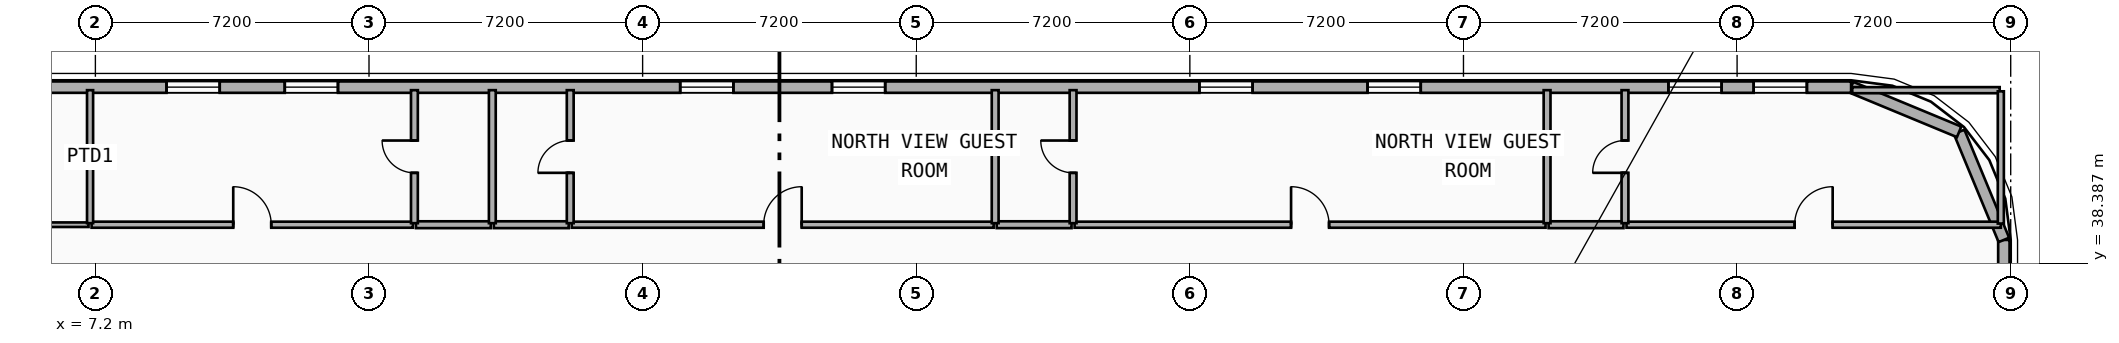
"""IFC4 building model, lengths in metres.
Left out: names, types, materials, properties, quantities, classifications, styles, units other than length and angle.
Written with IfcOpenShell. Run it as: python <this file> out.ifc"""

import sys

from ifc_helpers import new_model, si_unit, direction, frame, frame_2d, origin, place, context, subcontext, project, spatial, rectangle, extrude, element, fill, save


model = new_model("IFC4")
c1 = context("Model", 3, precision=1e-05, world=origin(), true_north=direction((0.0, 1.0)))
c2 = subcontext(c1, "Body", "Model", "MODEL_VIEW")
j1 = project(units=[si_unit("LENGTHUNIT", "METRE"), si_unit("PLANEANGLEUNIT", "RADIAN")], contexts=[c1])
p1 = place(None, origin())
s1 = spatial("IfcSite", under=j1, at=p1, CompositionType="ELEMENT")
p2 = place(p1, origin())
s2 = spatial("IfcBuilding", under=s1, at=p2, CompositionType="ELEMENT")
p3 = place(p2, frame((0.0, 0.0, 125.8)))
s3 = spatial("IfcBuildingStorey", under=s2, at=p3, CompositionType="ELEMENT", Elevation=125.8)
p4 = place(p3, frame((57.42, 39.0, 0.0), z_axis=(0.0, 0.0, 1.0), x_axis=(0.0, -1.0, 0.0)))
e1 = element("IfcWall", 1, at=p4, inside=s3, PredefinedType="SOLIDWALL", context=c2, shape_type="SweptSolid", body=[
    extrude(rectangle(XDim=18.0, YDim=0.3, at=frame_2d((9.0, 0.0))), origin(), (0.0, 0.0, 1.0), 3.24),
])
p5 = place(p4, frame((8.882, 0.0, 0.48)))
e2 = element("IfcOpeningElement", 2, at=p5, cuts=e1, PredefinedType="OPENING", context=c2, shape_type="SweptSolid", body=[
    extrude(rectangle(XDim=1.4, YDim=1.8, at=frame_2d((0.7, 0.9))), frame((0.0, 0.16, 0.0), z_axis=(0.0, -1.0, 0.0), x_axis=(1.0, 0.0, 0.0)), (0.0, 0.0, 1.0), 0.32),
])
p6 = place(p4, frame((3.621, 0.0, 0.48)))
e3 = element("IfcOpeningElement", 3, at=p6, cuts=e1, PredefinedType="OPENING", context=c2, shape_type="SweptSolid", body=[
    extrude(rectangle(XDim=1.4, YDim=1.8, at=frame_2d((0.7, 0.9))), frame((0.0, 0.16, 0.0), z_axis=(0.0, -1.0, 0.0), x_axis=(1.0, 0.0, 0.0)), (0.0, 0.0, 1.0), 0.32),
])
p7 = place(p4, frame((14.625, 0.0, 0.48)))
e4 = element("IfcOpeningElement", 4, at=p7, cuts=e1, PredefinedType="OPENING", context=c2, shape_type="SweptSolid", body=[
    extrude(rectangle(XDim=1.4, YDim=1.8, at=frame_2d((0.7, 0.9))), frame((0.0, 0.16, 0.0), z_axis=(0.0, -1.0, 0.0), x_axis=(1.0, 0.0, 0.0)), (0.0, 0.0, 1.0), 0.32),
])
p8 = place(p3, frame((56.243, 41.843, 0.0), z_axis=(0.0, 0.0, 1.0), x_axis=(0.382636798336, -0.92389884758, 0.0)))
e5 = element("IfcWall", 5, at=p8, inside=s3, PredefinedType="SOLIDWALL", context=c2, shape_type="SweptSolid", body=[
    extrude(rectangle(XDim=3.077, YDim=0.3, at=frame_2d((1.538, 0.0))), origin(), (0.0, 0.0, 1.0), 3.24),
])
p9 = place(p3, frame((53.4, 43.02, 0.0), z_axis=(0.0, 0.0, 1.0), x_axis=(0.923882414032, -0.382676475685, 0.0)))
e6 = element("IfcWall", 6, at=p9, inside=s3, PredefinedType="SOLIDWALL", context=c2, shape_type="SweptSolid", body=[
    extrude(rectangle(XDim=3.077, YDim=0.3, at=frame_2d((1.539, 0.0))), origin(), (0.0, 0.0, 1.0), 3.24),
])
p10 = place(p3, frame((4.2, 43.02, 0.0), z_axis=(0.0, 0.0, 1.0), x_axis=(1.0, 0.0, 0.0)))
e7 = element("IfcWall", 7, at=p10, inside=s3, PredefinedType="SOLIDWALL", context=c2, shape_type="SweptSolid", body=[
    extrude(rectangle(XDim=49.2, YDim=0.3, at=frame_2d((24.6, 0.0))), origin(), (0.0, 0.0, 1.0), 3.24),
])
p11 = place(p10, frame((4.872, 0.0, 0.85)))
e8 = element("IfcOpeningElement", 8, at=p11, cuts=e7, PredefinedType="OPENING", context=c2, shape_type="SweptSolid", body=[
    extrude(rectangle(XDim=1.4, YDim=1.8, at=frame_2d((0.7, 0.9))), frame((0.0, 0.16, 0.0), z_axis=(0.0, -1.0, 0.0), x_axis=(1.0, 0.0, 0.0)), (0.0, 0.0, 1.0), 0.32),
])
p12 = place(p10, frame((7.983, 0.0, 0.85)))
e9 = element("IfcOpeningElement", 9, at=p12, cuts=e7, PredefinedType="OPENING", context=c2, shape_type="SweptSolid", body=[
    extrude(rectangle(XDim=1.4, YDim=1.8, at=frame_2d((0.7, 0.9))), frame((0.0, 0.16, 0.0), z_axis=(0.0, -1.0, 0.0), x_axis=(1.0, 0.0, 0.0)), (0.0, 0.0, 1.0), 0.32),
])
p13 = place(p10, frame((18.389, 0.0, 0.85)))
e10 = element("IfcOpeningElement", 10, at=p13, cuts=e7, PredefinedType="OPENING", context=c2, shape_type="SweptSolid", body=[
    extrude(rectangle(XDim=1.4, YDim=1.8, at=frame_2d((0.7, 0.9))), frame((0.0, 0.16, 0.0), z_axis=(0.0, -1.0, 0.0), x_axis=(1.0, 0.0, 0.0)), (0.0, 0.0, 1.0), 0.32),
])
p14 = place(p10, frame((22.383, 0.0, 0.85)))
e11 = element("IfcOpeningElement", 11, at=p14, cuts=e7, PredefinedType="OPENING", context=c2, shape_type="SweptSolid", body=[
    extrude(rectangle(XDim=1.4, YDim=1.8, at=frame_2d((0.7, 0.9))), frame((0.0, 0.16, 0.0), z_axis=(0.0, -1.0, 0.0), x_axis=(1.0, 0.0, 0.0)), (0.0, 0.0, 1.0), 0.32),
])
p15 = place(p10, frame((32.051, 0.0, 0.85)))
e12 = element("IfcOpeningElement", 12, at=p15, cuts=e7, PredefinedType="OPENING", context=c2, shape_type="SweptSolid", body=[
    extrude(rectangle(XDim=1.4, YDim=1.8, at=frame_2d((0.7, 0.9))), frame((0.0, 0.16, 0.0), z_axis=(0.0, -1.0, 0.0), x_axis=(1.0, 0.0, 0.0)), (0.0, 0.0, 1.0), 0.32),
])
p16 = place(p10, frame((36.476, 0.0, 0.85)))
e13 = element("IfcOpeningElement", 13, at=p16, cuts=e7, PredefinedType="OPENING", context=c2, shape_type="SweptSolid", body=[
    extrude(rectangle(XDim=1.4, YDim=1.8, at=frame_2d((0.7, 0.9))), frame((0.0, 0.16, 0.0), z_axis=(0.0, -1.0, 0.0), x_axis=(1.0, 0.0, 0.0)), (0.0, 0.0, 1.0), 0.32),
])
p17 = place(p10, frame((44.393, 0.0, 0.85)))
e14 = element("IfcOpeningElement", 14, at=p17, cuts=e7, PredefinedType="OPENING", context=c2, shape_type="SweptSolid", body=[
    extrude(rectangle(XDim=1.4, YDim=1.8, at=frame_2d((0.7, 0.9))), frame((0.0, 0.16, 0.0), z_axis=(0.0, -1.0, 0.0), x_axis=(1.0, 0.0, 0.0)), (0.0, 0.0, 1.0), 0.32),
])
p18 = place(p10, frame((46.637, 0.0, 0.85)))
e15 = element("IfcOpeningElement", 15, at=p18, cuts=e7, PredefinedType="OPENING", context=c2, shape_type="SweptSolid", body=[
    extrude(rectangle(XDim=1.4, YDim=1.8, at=frame_2d((0.7, 0.9))), frame((0.0, 0.16, 0.0), z_axis=(0.0, -1.0, 0.0), x_axis=(1.0, 0.0, 0.0)), (0.0, 0.0, 1.0), 0.32),
])
p19 = place(p3, frame((0.26, 39.4, 0.0), z_axis=(0.0, 0.0, 1.0), x_axis=(1.0, 0.0, 0.0)))
e16 = element("IfcWall", 16, at=p19, inside=s3, PredefinedType="PARTITIONING", context=c2, shape_type="SweptSolid", body=[
    extrude(rectangle(XDim=6.76, YDim=0.12, at=frame_2d((3.38, 0.0))), origin(), (0.0, 0.0, 1.0), 3.24),
])
p20 = place(p19, frame((2.93, 0.0, 0.0)))
e17 = element("IfcOpeningElement", 17, at=p20, cuts=e16, PredefinedType="OPENING", context=c2, shape_type="SweptSolid", body=[
    extrude(rectangle(XDim=0.9, YDim=2.1, at=frame_2d((0.45, 1.05))), frame((0.0, 0.07, 0.0), z_axis=(0.0, -1.0, 0.0), x_axis=(1.0, 0.0, 0.0)), (0.0, 0.0, 1.0), 0.14),
])
p21 = place(p3, frame((7.1, 39.4, 0.0), z_axis=(0.0, 0.0, 1.0), x_axis=(1.0, 0.0, 0.0)))
e18 = element("IfcWall", 18, at=p21, inside=s3, PredefinedType="PARTITIONING", context=c2, shape_type="SweptSolid", body=[
    extrude(rectangle(XDim=8.455, YDim=0.16, at=frame_2d((4.228, 0.0))), origin(), (0.0, 0.0, 1.0), 3.24),
])
p22 = place(p21, frame((3.728, 0.0, 0.0)))
e19 = element("IfcOpeningElement", 19, at=p22, cuts=e18, PredefinedType="OPENING", context=c2, shape_type="SweptSolid", body=[
    extrude(rectangle(XDim=1.0, YDim=2.15, at=frame_2d((0.5, 1.075))), frame((0.0, 0.09, 0.0), z_axis=(0.0, -1.0, 0.0), x_axis=(1.0, 0.0, 0.0)), (0.0, 0.0, 1.0), 0.18),
])
p23 = place(p3, frame((15.635, 39.4, 0.0), z_axis=(0.0, 0.0, 1.0), x_axis=(1.0, 0.0, 0.0)))
e20 = element("IfcWall", 20, at=p23, inside=s3, PredefinedType="PLUMBINGWALL", context=c2, shape_type="SweptSolid", body=[
    extrude(rectangle(XDim=1.97, YDim=0.18, at=frame_2d((0.985, 0.0))), origin(), (0.0, 0.0, 1.0), 3.24),
])
p24 = place(p3, frame((19.735, 39.4, 0.0), z_axis=(0.0, 0.0, 1.0), x_axis=(1.0, 0.0, 0.0)))
e21 = element("IfcWall", 21, at=p24, inside=s3, PredefinedType="PARTITIONING", context=c2, shape_type="SweptSolid", body=[
    extrude(rectangle(XDim=11.102, YDim=0.16, at=frame_2d((5.551, 0.0))), origin(), (0.0, 0.0, 1.0), 3.24),
])
p25 = place(p24, frame((5.051, 0.0, 0.0)))
e22 = element("IfcOpeningElement", 22, at=p25, cuts=e21, PredefinedType="OPENING", context=c2, shape_type="SweptSolid", body=[
    extrude(rectangle(XDim=1.0, YDim=2.15, at=frame_2d((0.5, 1.075))), frame((0.0, 0.09, 0.0), z_axis=(0.0, -1.0, 0.0), x_axis=(1.0, 0.0, 0.0)), (0.0, 0.0, 1.0), 0.18),
])
p26 = place(p3, frame((17.685, 39.4, 0.0), z_axis=(0.0, 0.0, 1.0), x_axis=(1.0, 0.0, 0.0)))
e23 = element("IfcWall", 23, at=p26, inside=s3, PredefinedType="PLUMBINGWALL", context=c2, shape_type="SweptSolid", body=[
    extrude(rectangle(XDim=1.97, YDim=0.18, at=frame_2d((0.985, 0.0))), origin(), (0.0, 0.0, 1.0), 3.24),
])
p27 = place(p3, frame((32.967, 39.4, 0.0), z_axis=(0.0, 0.0, 1.0), x_axis=(1.0, 0.0, 0.0)))
e24 = element("IfcWall", 24, at=p27, inside=s3, PredefinedType="PARTITIONING", context=c2, shape_type="SweptSolid", body=[
    extrude(rectangle(XDim=12.393, YDim=0.16, at=frame_2d((6.197, 0.0))), origin(), (0.0, 0.0, 1.0), 3.24),
])
p28 = place(p27, frame((5.697, 0.0, 0.0)))
e25 = element("IfcOpeningElement", 25, at=p28, cuts=e24, PredefinedType="OPENING", context=c2, shape_type="SweptSolid", body=[
    extrude(rectangle(XDim=1.0, YDim=2.15, at=frame_2d((0.5, 1.075))), frame((0.0, 0.09, 0.0), z_axis=(0.0, -1.0, 0.0), x_axis=(1.0, 0.0, 0.0)), (0.0, 0.0, 1.0), 0.18),
])
p29 = place(p3, frame((30.917, 39.4, 0.0), z_axis=(0.0, 0.0, 1.0), x_axis=(1.0, 0.0, 0.0)))
e26 = element("IfcWall", 26, at=p29, inside=s3, PredefinedType="PLUMBINGWALL", context=c2, shape_type="SweptSolid", body=[
    extrude(rectangle(XDim=1.97, YDim=0.18, at=frame_2d((0.985, 0.0))), origin(), (0.0, 0.0, 1.0), 3.24),
])
p30 = place(p3, frame((47.49, 39.4, 0.0), z_axis=(0.0, 0.0, 1.0), x_axis=(1.0, 0.0, 0.0)))
e27 = element("IfcWall", 27, at=p30, inside=s3, PredefinedType="PARTITIONING", context=c2, shape_type="SweptSolid", body=[
    extrude(rectangle(XDim=9.85, YDim=0.16, at=frame_2d((4.925, 0.0))), origin(), (0.0, 0.0, 1.0), 3.24),
])
p31 = place(p30, frame((4.425, 0.0, 0.0)))
e28 = element("IfcOpeningElement", 28, at=p31, cuts=e27, PredefinedType="OPENING", context=c2, shape_type="SweptSolid", body=[
    extrude(rectangle(XDim=1.0, YDim=2.15, at=frame_2d((0.5, 1.075))), frame((0.0, 0.09, 0.0), z_axis=(0.0, -1.0, 0.0), x_axis=(1.0, 0.0, 0.0)), (0.0, 0.0, 1.0), 0.18),
])
p32 = place(p3, frame((45.44, 39.4, 0.0), z_axis=(0.0, 0.0, 1.0), x_axis=(1.0, 0.0, 0.0)))
e29 = element("IfcWall", 29, at=p32, inside=s3, PredefinedType="PLUMBINGWALL", context=c2, shape_type="SweptSolid", body=[
    extrude(rectangle(XDim=1.97, YDim=0.18, at=frame_2d((0.985, 0.0))), origin(), (0.0, 0.0, 1.0), 3.24),
])
p33 = place(p3, frame((7.06, 39.44, 0.0), z_axis=(0.0, 0.0, 1.0), x_axis=(0.0, 1.0, 0.0)))
e30 = element("IfcWall", 30, at=p33, inside=s3, PredefinedType="PARTITIONING", context=c2, shape_type="SweptSolid", body=[
    extrude(rectangle(XDim=3.5, YDim=0.16, at=frame_2d((1.75, 0.0))), origin(), (0.0, 0.0, 1.0), 3.24),
])
p34 = place(p3, frame((15.595, 39.44, 0.0), z_axis=(0.0, 0.0, 1.0), x_axis=(0.0, 1.0, 0.0)))
e31 = element("IfcWall", 31, at=p34, inside=s3, PredefinedType="PLUMBINGWALL", context=c2, shape_type="SweptSolid", body=[
    extrude(rectangle(XDim=3.5, YDim=0.18, at=frame_2d((1.75, 0.0))), origin(), (0.0, 0.0, 1.0), 3.24),
])
p35 = place(p34, frame((1.325, 0.0, 0.0)))
e32 = element("IfcOpeningElement", 32, at=p35, cuts=e31, PredefinedType="OPENING", context=c2, shape_type="SweptSolid", body=[
    extrude(rectangle(XDim=0.85, YDim=2.1, at=frame_2d((0.425, 1.05))), frame((0.0, 0.1, 0.0), z_axis=(0.0, -1.0, 0.0), x_axis=(1.0, 0.0, 0.0)), (0.0, 0.0, 1.0), 0.2),
])
p36 = place(p3, frame((17.645, 39.44, 0.0), z_axis=(0.0, 0.0, 1.0), x_axis=(0.0, 1.0, 0.0)))
e33 = element("IfcWall", 33, at=p36, inside=s3, PredefinedType="PLUMBINGWALL", context=c2, shape_type="SweptSolid", body=[
    extrude(rectangle(XDim=3.5, YDim=0.18, at=frame_2d((1.75, 0.0))), origin(), (0.0, 0.0, 1.0), 3.24),
])
p37 = place(p3, frame((19.695, 39.44, 0.0), z_axis=(0.0, 0.0, 1.0), x_axis=(0.0, 1.0, 0.0)))
e34 = element("IfcWall", 34, at=p37, inside=s3, PredefinedType="PLUMBINGWALL", context=c2, shape_type="SweptSolid", body=[
    extrude(rectangle(XDim=3.5, YDim=0.18, at=frame_2d((1.75, 0.0))), origin(), (0.0, 0.0, 1.0), 3.24),
])
p38 = place(p37, frame((1.325, 0.0, 0.0)))
e35 = element("IfcOpeningElement", 35, at=p38, cuts=e34, PredefinedType="OPENING", context=c2, shape_type="SweptSolid", body=[
    extrude(rectangle(XDim=0.85, YDim=2.1, at=frame_2d((0.425, 1.05))), frame((0.0, 0.1, 0.0), z_axis=(0.0, -1.0, 0.0), x_axis=(1.0, 0.0, 0.0)), (0.0, 0.0, 1.0), 0.2),
])
p39 = place(p3, frame((30.877, 39.44, 0.0), z_axis=(0.0, 0.0, 1.0), x_axis=(0.0, 1.0, 0.0)))
e36 = element("IfcWall", 36, at=p39, inside=s3, PredefinedType="PLUMBINGWALL", context=c2, shape_type="SweptSolid", body=[
    extrude(rectangle(XDim=3.5, YDim=0.18, at=frame_2d((1.75, 0.0))), origin(), (0.0, 0.0, 1.0), 3.24),
])
p40 = place(p3, frame((32.927, 39.44, 0.0), z_axis=(0.0, 0.0, 1.0), x_axis=(0.0, 1.0, 0.0)))
e37 = element("IfcWall", 37, at=p40, inside=s3, PredefinedType="PLUMBINGWALL", context=c2, shape_type="SweptSolid", body=[
    extrude(rectangle(XDim=3.5, YDim=0.18, at=frame_2d((1.75, 0.0))), origin(), (0.0, 0.0, 1.0), 3.24),
])
p41 = place(p40, frame((1.325, 0.0, 0.0)))
e38 = element("IfcOpeningElement", 38, at=p41, cuts=e37, PredefinedType="OPENING", context=c2, shape_type="SweptSolid", body=[
    extrude(rectangle(XDim=0.85, YDim=2.1, at=frame_2d((0.425, 1.05))), frame((0.0, 0.1, 0.0), z_axis=(0.0, -1.0, 0.0), x_axis=(1.0, 0.0, 0.0)), (0.0, 0.0, 1.0), 0.2),
])
p42 = place(p3, frame((45.4, 39.44, 0.0), z_axis=(0.0, 0.0, 1.0), x_axis=(0.0, 1.0, 0.0)))
e39 = element("IfcWall", 39, at=p42, inside=s3, PredefinedType="PLUMBINGWALL", context=c2, shape_type="SweptSolid", body=[
    extrude(rectangle(XDim=3.5, YDim=0.18, at=frame_2d((1.75, 0.0))), origin(), (0.0, 0.0, 1.0), 3.24),
])
p43 = place(p3, frame((47.45, 39.44, 0.0), z_axis=(0.0, 0.0, 1.0), x_axis=(0.0, 1.0, 0.0)))
e40 = element("IfcWall", 40, at=p43, inside=s3, PredefinedType="PLUMBINGWALL", context=c2, shape_type="SweptSolid", body=[
    extrude(rectangle(XDim=3.5, YDim=0.18, at=frame_2d((1.75, 0.0))), origin(), (0.0, 0.0, 1.0), 3.24),
])
p44 = place(p43, frame((1.325, 0.0, 0.0)))
e41 = element("IfcOpeningElement", 41, at=p44, cuts=e40, PredefinedType="OPENING", context=c2, shape_type="SweptSolid", body=[
    extrude(rectangle(XDim=0.85, YDim=2.1, at=frame_2d((0.425, 1.05))), frame((0.0, 0.1, 0.0), z_axis=(0.0, -1.0, 0.0), x_axis=(1.0, 0.0, 0.0)), (0.0, 0.0, 1.0), 0.2),
])
p45 = place(p3, frame((53.43, 42.94, 0.0), z_axis=(0.0, 0.0, 1.0), x_axis=(1.0, 0.0, 0.0)))
e42 = element("IfcWall", 42, at=p45, inside=s3, PredefinedType="PARTITIONING", context=c2, shape_type="SweptSolid", body=[
    extrude(rectangle(XDim=3.88, YDim=0.16, at=frame_2d((1.94, 0.0))), origin(), (0.0, 0.0, 1.0), 3.24),
])
p46 = place(p3, frame((57.34, 39.43, 0.0), z_axis=(0.0, 0.0, 1.0), x_axis=(0.0, 1.0, 0.0)))
e43 = element("IfcWall", 43, at=p46, inside=s3, PredefinedType="PARTITIONING", context=c2, shape_type="SweptSolid", body=[
    extrude(rectangle(XDim=3.48, YDim=0.16, at=frame_2d((1.74, 0.0))), origin(), (0.0, 0.0, 1.0), 3.24),
])
p47 = place(p11, origin())
e44 = element("IfcWindow", 44, at=p47, inside=s3, PartitioningType="SINGLE_PANEL", PredefinedType="WINDOW", context=c2, shape_type="SweptSolid", body=[
    extrude(rectangle(XDim=1.4, YDim=1.8, at=frame_2d((0.7, 0.9))), frame((0.0, 0.03, 0.0), z_axis=(0.0, -1.0, 0.0), x_axis=(1.0, 0.0, 0.0)), (0.0, 0.0, 1.0), 0.06),
])
fill(e8, e44)
p48 = place(p12, origin())
e45 = element("IfcWindow", 45, at=p48, inside=s3, PartitioningType="SINGLE_PANEL", PredefinedType="WINDOW", context=c2, shape_type="SweptSolid", body=[
    extrude(rectangle(XDim=1.4, YDim=1.8, at=frame_2d((0.7, 0.9))), frame((0.0, 0.03, 0.0), z_axis=(0.0, -1.0, 0.0), x_axis=(1.0, 0.0, 0.0)), (0.0, 0.0, 1.0), 0.06),
])
fill(e9, e45)
p49 = place(p13, origin())
e46 = element("IfcWindow", 46, at=p49, inside=s3, PartitioningType="SINGLE_PANEL", PredefinedType="WINDOW", context=c2, shape_type="SweptSolid", body=[
    extrude(rectangle(XDim=1.4, YDim=1.8, at=frame_2d((0.7, 0.9))), frame((0.0, 0.03, 0.0), z_axis=(0.0, -1.0, 0.0), x_axis=(1.0, 0.0, 0.0)), (0.0, 0.0, 1.0), 0.06),
])
fill(e10, e46)
p50 = place(p14, origin())
e47 = element("IfcWindow", 47, at=p50, inside=s3, PartitioningType="SINGLE_PANEL", PredefinedType="WINDOW", context=c2, shape_type="SweptSolid", body=[
    extrude(rectangle(XDim=1.4, YDim=1.8, at=frame_2d((0.7, 0.9))), frame((0.0, 0.03, 0.0), z_axis=(0.0, -1.0, 0.0), x_axis=(1.0, 0.0, 0.0)), (0.0, 0.0, 1.0), 0.06),
])
fill(e11, e47)
p51 = place(p15, origin())
e48 = element("IfcWindow", 48, at=p51, inside=s3, PartitioningType="SINGLE_PANEL", PredefinedType="WINDOW", context=c2, shape_type="SweptSolid", body=[
    extrude(rectangle(XDim=1.4, YDim=1.8, at=frame_2d((0.7, 0.9))), frame((0.0, 0.03, 0.0), z_axis=(0.0, -1.0, 0.0), x_axis=(1.0, 0.0, 0.0)), (0.0, 0.0, 1.0), 0.06),
])
fill(e12, e48)
p52 = place(p16, origin())
e49 = element("IfcWindow", 49, at=p52, inside=s3, PartitioningType="SINGLE_PANEL", PredefinedType="WINDOW", context=c2, shape_type="SweptSolid", body=[
    extrude(rectangle(XDim=1.4, YDim=1.8, at=frame_2d((0.7, 0.9))), frame((0.0, 0.03, 0.0), z_axis=(0.0, -1.0, 0.0), x_axis=(1.0, 0.0, 0.0)), (0.0, 0.0, 1.0), 0.06),
])
fill(e13, e49)
p53 = place(p17, origin())
e50 = element("IfcWindow", 50, at=p53, inside=s3, PartitioningType="SINGLE_PANEL", PredefinedType="WINDOW", context=c2, shape_type="SweptSolid", body=[
    extrude(rectangle(XDim=1.4, YDim=1.8, at=frame_2d((0.7, 0.9))), frame((0.0, 0.03, 0.0), z_axis=(0.0, -1.0, 0.0), x_axis=(1.0, 0.0, 0.0)), (0.0, 0.0, 1.0), 0.06),
])
fill(e14, e50)
p54 = place(p18, origin())
e51 = element("IfcWindow", 51, at=p54, inside=s3, PartitioningType="SINGLE_PANEL", PredefinedType="WINDOW", context=c2, shape_type="SweptSolid", body=[
    extrude(rectangle(XDim=1.4, YDim=1.8, at=frame_2d((0.7, 0.9))), frame((0.0, 0.03, 0.0), z_axis=(0.0, -1.0, 0.0), x_axis=(1.0, 0.0, 0.0)), (0.0, 0.0, 1.0), 0.06),
])
fill(e15, e51)
p55 = place(p22, origin())
e52 = element("IfcDoor", 52, at=p55, inside=s3, OperationType="SINGLE_SWING_LEFT", PredefinedType="DOOR", context=c2, shape_type="SweptSolid", body=[
    extrude(rectangle(XDim=1.0, YDim=2.15, at=frame_2d((0.5, 1.075))), frame((0.0, 0.025, 0.0), z_axis=(0.0, -1.0, 0.0), x_axis=(1.0, 0.0, 0.0)), (0.0, 0.0, 1.0), 0.05),
])
fill(e19, e52)
p56 = place(p25, origin())
e53 = element("IfcDoor", 53, at=p56, inside=s3, OperationType="SINGLE_SWING_RIGHT", PredefinedType="DOOR", context=c2, shape_type="SweptSolid", body=[
    extrude(rectangle(XDim=1.0, YDim=2.15, at=frame_2d((0.5, 1.075))), frame((0.0, 0.025, 0.0), z_axis=(0.0, -1.0, 0.0), x_axis=(1.0, 0.0, 0.0)), (0.0, 0.0, 1.0), 0.05),
])
fill(e22, e53)
p57 = place(p28, origin())
e54 = element("IfcDoor", 54, at=p57, inside=s3, OperationType="SINGLE_SWING_LEFT", PredefinedType="DOOR", context=c2, shape_type="SweptSolid", body=[
    extrude(rectangle(XDim=1.0, YDim=2.15, at=frame_2d((0.5, 1.075))), frame((0.0, 0.025, 0.0), z_axis=(0.0, -1.0, 0.0), x_axis=(1.0, 0.0, 0.0)), (0.0, 0.0, 1.0), 0.05),
])
fill(e25, e54)
p58 = place(p31, origin())
e55 = element("IfcDoor", 55, at=p58, inside=s3, OperationType="SINGLE_SWING_RIGHT", PredefinedType="DOOR", context=c2, shape_type="SweptSolid", body=[
    extrude(rectangle(XDim=1.0, YDim=2.15, at=frame_2d((0.5, 1.075))), frame((0.0, 0.025, 0.0), z_axis=(0.0, -1.0, 0.0), x_axis=(1.0, 0.0, 0.0)), (0.0, 0.0, 1.0), 0.05),
])
fill(e28, e55)
p59 = place(p35, origin())
e56 = element("IfcDoor", 56, at=p59, inside=s3, OperationType="SINGLE_SWING_RIGHT", PredefinedType="DOOR", context=c2, shape_type="SweptSolid", body=[
    extrude(rectangle(XDim=0.85, YDim=2.1, at=frame_2d((0.425, 1.05))), frame((0.0, 0.025, 0.0), z_axis=(0.0, -1.0, 0.0), x_axis=(1.0, 0.0, 0.0)), (0.0, 0.0, 1.0), 0.05),
])
fill(e32, e56)
p60 = place(p38, origin())
e57 = element("IfcDoor", 57, at=p60, inside=s3, OperationType="SINGLE_SWING_LEFT", PredefinedType="DOOR", context=c2, shape_type="SweptSolid", body=[
    extrude(rectangle(XDim=0.85, YDim=2.1, at=frame_2d((0.425, 1.05))), frame((0.0, 0.025, 0.0), z_axis=(0.0, -1.0, 0.0), x_axis=(1.0, 0.0, 0.0)), (0.0, 0.0, 1.0), 0.05),
])
fill(e35, e57)
p61 = place(p41, origin())
e58 = element("IfcDoor", 58, at=p61, inside=s3, OperationType="SINGLE_SWING_RIGHT", PredefinedType="DOOR", context=c2, shape_type="SweptSolid", body=[
    extrude(rectangle(XDim=0.85, YDim=2.1, at=frame_2d((0.425, 1.05))), frame((0.0, 0.025, 0.0), z_axis=(0.0, -1.0, 0.0), x_axis=(1.0, 0.0, 0.0)), (0.0, 0.0, 1.0), 0.05),
])
fill(e38, e58)
p62 = place(p44, origin())
e59 = element("IfcDoor", 59, at=p62, inside=s3, OperationType="SINGLE_SWING_LEFT", PredefinedType="DOOR", context=c2, shape_type="SweptSolid", body=[
    extrude(rectangle(XDim=0.85, YDim=2.1, at=frame_2d((0.425, 1.05))), frame((0.0, 0.025, 0.0), z_axis=(0.0, -1.0, 0.0), x_axis=(1.0, 0.0, 0.0)), (0.0, 0.0, 1.0), 0.05),
])
fill(e41, e59)
save(model, sys.argv[1])
